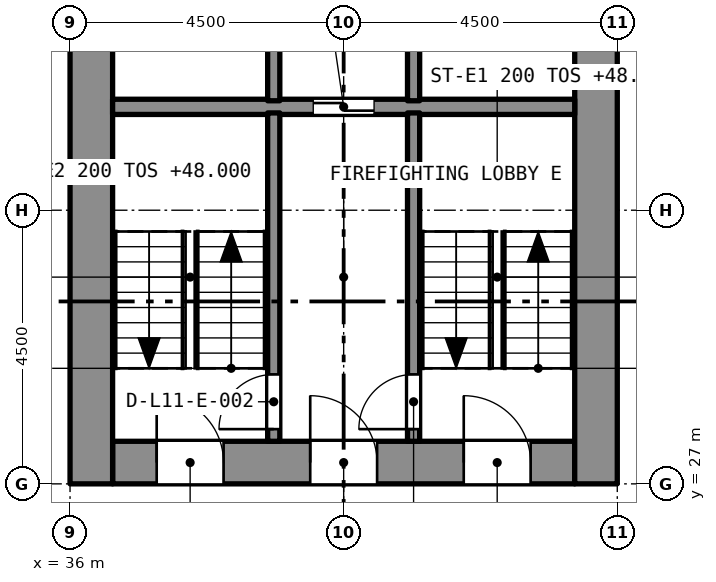
"""IFC4 building model, lengths in metres.
Left out: names, types, materials, properties, quantities, classifications, styles, units other than length and angle.
Written with IfcOpenShell. Run it as: python <this file> out.ifc"""

import sys

from ifc_helpers import new_model, si_unit, direction, frame, frame_2d, origin, place, context, subcontext, project, spatial, rectangle, extrude, element, fill, save


model = new_model("IFC4")
c1 = context("Model", 3, precision=1e-05, world=origin(), true_north=direction((0.0, 1.0)))
c2 = subcontext(c1, "Body", "Model", "MODEL_VIEW")
j1 = project(units=[si_unit("LENGTHUNIT", "METRE"), si_unit("PLANEANGLEUNIT", "RADIAN")], contexts=[c1])
p1 = place(None, origin())
s1 = spatial("IfcSite", under=j1, at=p1, CompositionType="ELEMENT")
p2 = place(p1, origin())
s2 = spatial("IfcBuilding", under=s1, at=p2, CompositionType="ELEMENT")
p3 = place(p2, frame((0.0, 0.0, 46.4)))
s3 = spatial("IfcBuildingStorey", under=s2, at=p3, CompositionType="ELEMENT", Elevation=46.4)
p4 = place(p3, frame((36.7, 27.35, 0.0), z_axis=(0.0, 0.0, 1.0), x_axis=(1.0, 0.0, 0.0)))
e1 = element("IfcWall", 1, at=p4, inside=s3, PredefinedType="SOLIDWALL", context=c2, shape_type="SweptSolid", body=[
    extrude(rectangle(XDim=7.6, YDim=0.7, at=frame_2d((3.8, 0.0))), origin(), (0.0, 0.0, 1.0), 3.2),
])
p5 = place(p4, frame((5.775, 0.0, 0.0)))
e2 = element("IfcOpeningElement", 2, at=p5, cuts=e1, PredefinedType="OPENING", context=c2, shape_type="SweptSolid", body=[
    extrude(rectangle(XDim=1.1, YDim=2.1, at=frame_2d((0.55, 1.05))), frame((0.0, 0.36, 0.0), z_axis=(0.0, -1.0, 0.0), x_axis=(1.0, 0.0, 0.0)), (0.0, 0.0, 1.0), 0.72),
])
p6 = place(p4, frame((3.25, 0.0, 0.0)))
e3 = element("IfcOpeningElement", 3, at=p6, cuts=e1, PredefinedType="OPENING", context=c2, shape_type="SweptSolid", body=[
    extrude(rectangle(XDim=1.1, YDim=2.1, at=frame_2d((0.55, 1.05))), frame((0.0, 0.36, 0.0), z_axis=(0.0, -1.0, 0.0), x_axis=(1.0, 0.0, 0.0)), (0.0, 0.0, 1.0), 0.72),
])
p7 = place(p4, frame((0.725, 0.0, 0.0)))
e4 = element("IfcOpeningElement", 4, at=p7, cuts=e1, PredefinedType="OPENING", context=c2, shape_type="SweptSolid", body=[
    extrude(rectangle(XDim=1.1, YDim=2.1, at=frame_2d((0.55, 1.05))), frame((0.0, 0.36, 0.0), z_axis=(0.0, -1.0, 0.0), x_axis=(1.0, 0.0, 0.0)), (0.0, 0.0, 1.0), 0.72),
])
p8 = place(p3, frame((36.35, 27.0, 0.0), z_axis=(0.0, 0.0, 1.0), x_axis=(0.0, 1.0, 0.0)))
e5 = element("IfcWall", 5, at=p8, inside=s3, PredefinedType="SOLIDWALL", context=c2, shape_type="SweptSolid", body=[
    extrude(rectangle(XDim=13.5, YDim=0.7, at=frame_2d((6.75, 0.0))), origin(), (0.0, 0.0, 1.0), 3.2),
])
p9 = place(p8, frame((8.95, 0.0, 0.0)))
e6 = element("IfcOpeningElement", 6, at=p9, cuts=e5, PredefinedType="OPENING", context=c2, shape_type="SweptSolid", body=[
    extrude(rectangle(XDim=1.2, YDim=2.1, at=frame_2d((0.6, 1.05))), frame((0.0, 0.36, 0.0), z_axis=(0.0, -1.0, 0.0), x_axis=(1.0, 0.0, 0.0)), (0.0, 0.0, 1.0), 0.72),
])
p10 = place(p3, frame((44.65, 27.0, 0.0), z_axis=(0.0, 0.0, 1.0), x_axis=(0.0, 1.0, 0.0)))
e7 = element("IfcWall", 7, at=p10, inside=s3, PredefinedType="SOLIDWALL", context=c2, shape_type="SweptSolid", body=[
    extrude(rectangle(XDim=13.5, YDim=0.7, at=frame_2d((6.75, 0.0))), origin(), (0.0, 0.0, 1.0), 3.2),
])
p11 = place(p10, frame((8.95, 0.0, 0.0)))
e8 = element("IfcOpeningElement", 8, at=p11, cuts=e7, PredefinedType="OPENING", context=c2, shape_type="SweptSolid", body=[
    extrude(rectangle(XDim=1.2, YDim=2.1, at=frame_2d((0.6, 1.05))), frame((0.0, 0.36, 0.0), z_axis=(0.0, -1.0, 0.0), x_axis=(1.0, 0.0, 0.0)), (0.0, 0.0, 1.0), 0.72),
])
p12 = place(p3, frame((36.7, 33.2, 0.0), z_axis=(0.0, 0.0, 1.0), x_axis=(1.0, 0.0, 0.0)))
e9 = element("IfcWall", 9, at=p12, inside=s3, PredefinedType="SOLIDWALL", context=c2, shape_type="SweptSolid", body=[
    extrude(rectangle(XDim=7.6, YDim=0.25, at=frame_2d((3.8, 0.0))), origin(), (0.0, 0.0, 1.0), 2.9),
])
p13 = place(p12, frame((3.3, 0.0, 0.0)))
e10 = element("IfcOpeningElement", 10, at=p13, cuts=e9, PredefinedType="OPENING", context=c2, shape_type="SweptSolid", body=[
    extrude(rectangle(XDim=1.0, YDim=2.1, at=frame_2d((0.5, 1.05))), frame((0.0, 0.135, 0.0), z_axis=(0.0, -1.0, 0.0), x_axis=(1.0, 0.0, 0.0)), (0.0, 0.0, 1.0), 0.27),
])
p14 = place(p3, frame((41.65, 27.7, 0.0), z_axis=(0.0, 0.0, 1.0), x_axis=(0.0, 1.0, 0.0)))
e11 = element("IfcWall", 11, at=p14, inside=s3, PredefinedType="SOLIDWALL", context=c2, shape_type="SweptSolid", body=[
    extrude(rectangle(XDim=5.4, YDim=0.2, at=frame_2d((2.7, 0.0))), origin(), (0.0, 0.0, 1.0), 2.9),
])
p15 = place(p14, frame((0.2, 0.0, 0.0)))
e12 = element("IfcOpeningElement", 12, at=p15, cuts=e11, PredefinedType="OPENING", context=c2, shape_type="SweptSolid", body=[
    extrude(rectangle(XDim=0.9, YDim=2.1, at=frame_2d((0.45, 1.05))), frame((0.0, 0.11, 0.0), z_axis=(0.0, -1.0, 0.0), x_axis=(1.0, 0.0, 0.0)), (0.0, 0.0, 1.0), 0.22),
])
p16 = place(p3, frame((39.35, 27.7, 0.0), z_axis=(0.0, 0.0, 1.0), x_axis=(0.0, 1.0, 0.0)))
e13 = element("IfcWall", 13, at=p16, inside=s3, PredefinedType="SOLIDWALL", context=c2, shape_type="SweptSolid", body=[
    extrude(rectangle(XDim=5.4, YDim=0.2, at=frame_2d((2.7, 0.0))), origin(), (0.0, 0.0, 1.0), 2.9),
])
p17 = place(p16, frame((0.2, 0.0, 0.0)))
e14 = element("IfcOpeningElement", 14, at=p17, cuts=e13, PredefinedType="OPENING", context=c2, shape_type="SweptSolid", body=[
    extrude(rectangle(XDim=0.9, YDim=2.1, at=frame_2d((0.45, 1.05))), frame((0.0, 0.11, 0.0), z_axis=(0.0, -1.0, 0.0), x_axis=(1.0, 0.0, 0.0)), (0.0, 0.0, 1.0), 0.22),
])
for number, where, z_axis, x_axis in (
    (15, (41.65, 33.3, 0.0), (0.0, 0.0, 1.0), (0.0, 1.0, 0.0)),
    (16, (39.35, 33.3, 0.0), (0.0, 0.0, 1.0), (0.0, 1.0, 0.0)),
):
    element("IfcWall", number, at=place(p3, frame(where, z_axis=z_axis, x_axis=x_axis)), inside=s3, PredefinedType="SOLIDWALL", context=c2, shape_type="SweptSolid", body=[
        extrude(rectangle(XDim=2.3, YDim=0.2, at=frame_2d((1.15, 0.0))), origin(), (0.0, 0.0, 1.0), 2.9),
    ])
p18 = place(p15, origin())
e17 = element("IfcDoor", 17, at=p18, inside=s3, OperationType="SINGLE_SWING_LEFT", PredefinedType="DOOR", context=c2, shape_type="SweptSolid", body=[
    extrude(rectangle(XDim=0.9, YDim=2.1, at=frame_2d((0.45, 1.05))), frame((0.0, 0.025, 0.0), z_axis=(0.0, -1.0, 0.0), x_axis=(1.0, 0.0, 0.0)), (0.0, 0.0, 1.0), 0.05),
])
fill(e12, e17)
p19 = place(p17, origin())
e18 = element("IfcDoor", 18, at=p19, inside=s3, OperationType="SINGLE_SWING_LEFT", PredefinedType="DOOR", context=c2, shape_type="SweptSolid", body=[
    extrude(rectangle(XDim=0.9, YDim=2.1, at=frame_2d((0.45, 1.05))), frame((0.0, 0.025, 0.0), z_axis=(0.0, -1.0, 0.0), x_axis=(1.0, 0.0, 0.0)), (0.0, 0.0, 1.0), 0.05),
])
fill(e14, e18)
p20 = place(p13, origin())
e19 = element("IfcDoor", 19, at=p20, inside=s3, OperationType="SLIDING_TO_LEFT", PredefinedType="DOOR", context=c2, shape_type="SweptSolid", body=[
    extrude(rectangle(XDim=1.0, YDim=2.1, at=frame_2d((0.5, 1.05))), frame((0.0, 0.025, 0.0), z_axis=(0.0, -1.0, 0.0), x_axis=(1.0, 0.0, 0.0)), (0.0, 0.0, 1.0), 0.05),
])
fill(e10, e19)
p21 = place(p5, origin())
e20 = element("IfcDoor", 20, at=p21, inside=s3, OperationType="SINGLE_SWING_LEFT", PredefinedType="DOOR", context=c2, shape_type="SweptSolid", body=[
    extrude(rectangle(XDim=1.1, YDim=2.1, at=frame_2d((0.55, 1.05))), frame((0.0, 0.025, 0.0), z_axis=(0.0, -1.0, 0.0), x_axis=(1.0, 0.0, 0.0)), (0.0, 0.0, 1.0), 0.05),
])
fill(e2, e20)
p22 = place(p6, origin())
e21 = element("IfcDoor", 21, at=p22, inside=s3, OperationType="SINGLE_SWING_LEFT", PredefinedType="DOOR", context=c2, shape_type="SweptSolid", body=[
    extrude(rectangle(XDim=1.1, YDim=2.1, at=frame_2d((0.55, 1.05))), frame((0.0, 0.025, 0.0), z_axis=(0.0, -1.0, 0.0), x_axis=(1.0, 0.0, 0.0)), (0.0, 0.0, 1.0), 0.05),
])
fill(e3, e21)
p23 = place(p7, origin())
e22 = element("IfcDoor", 22, at=p23, inside=s3, OperationType="SINGLE_SWING_LEFT", PredefinedType="DOOR", context=c2, shape_type="SweptSolid", body=[
    extrude(rectangle(XDim=1.1, YDim=2.1, at=frame_2d((0.55, 1.05))), frame((0.0, 0.025, 0.0), z_axis=(0.0, -1.0, 0.0), x_axis=(1.0, 0.0, 0.0)), (0.0, 0.0, 1.0), 0.05),
])
fill(e4, e22)
save(model, sys.argv[1])
